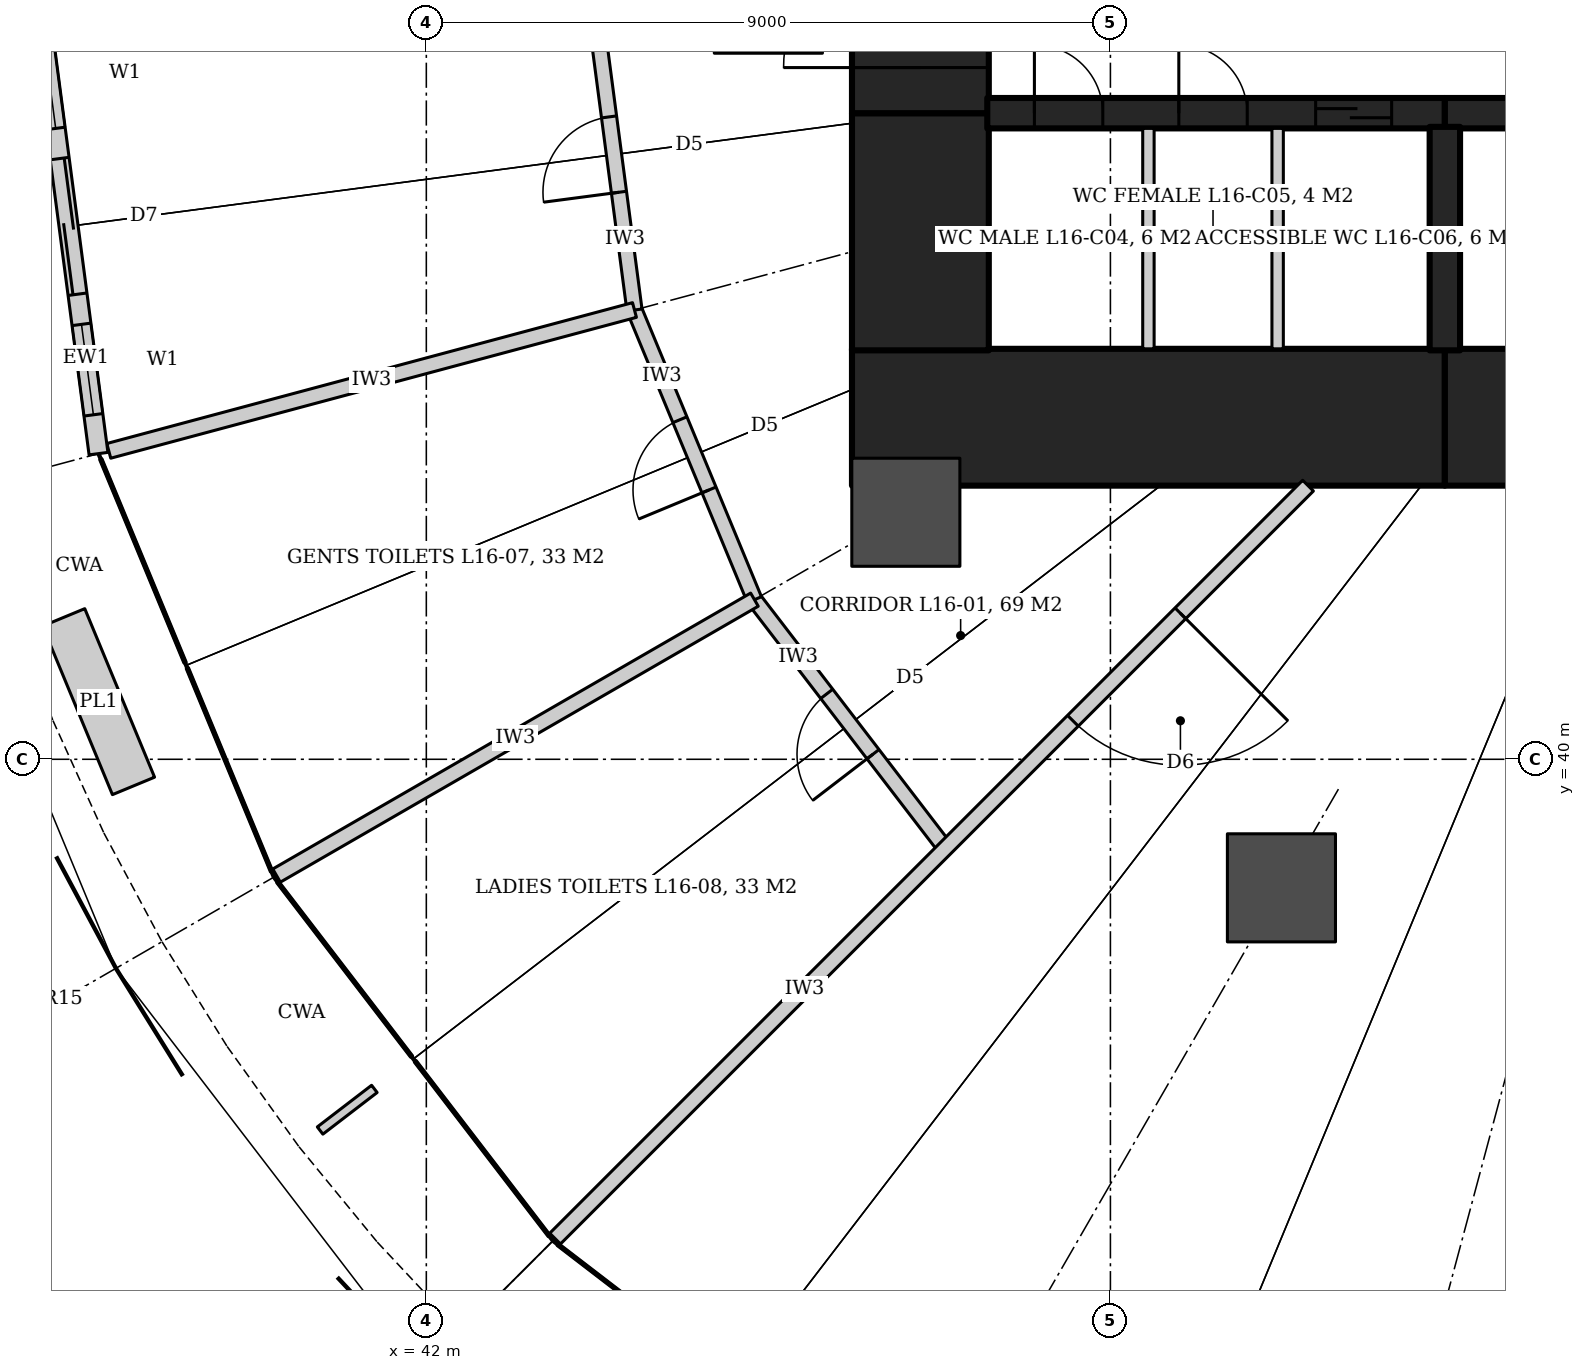
"""IFC4 building model, lengths in metres.
Left out: names, types, materials, properties, quantities, classifications, styles, units other than length and angle.
Written with IfcOpenShell. Run it as: python <this file> out.ifc"""

import sys

from ifc_helpers import new_model, si_unit, direction, frame, frame_2d, origin, origin_2d, place, context, subcontext, project, spatial, rectangle, hollow_circle, extrude, element, fill, save


model = new_model("IFC4")
c1 = context("Model", 3, precision=1e-05, world=origin(), true_north=direction((0.0, 1.0)))
c2 = subcontext(c1, "Body", "Model", "MODEL_VIEW")
j1 = project(units=[si_unit("LENGTHUNIT", "METRE"), si_unit("PLANEANGLEUNIT", "RADIAN")], contexts=[c1])
p1 = place(None, origin())
s1 = spatial("IfcSite", under=j1, at=p1, CompositionType="ELEMENT")
p2 = place(p1, origin())
s2 = spatial("IfcBuilding", under=s1, at=p2, CompositionType="ELEMENT")
p3 = place(p2, frame((0.0, 0.0, 68.0)))
s3 = spatial("IfcBuildingStorey", under=s2, at=p3, CompositionType="ELEMENT", Elevation=68.0)
p4 = place(p3, frame((47.6, 44.5, 0.0), z_axis=(0.0, 0.0, 1.0), x_axis=(1.0, 0.0, 0.0)))
e1 = element("IfcWall", 1, at=p4, inside=s3, PredefinedType="SHEAR", context=c2, shape_type="SweptSolid", body=[
    extrude(rectangle(XDim=7.8, YDim=1.8, at=frame_2d((3.9, 0.0))), origin(), (0.0, 0.0, 1.0), 4.2),
])
p5 = place(p3, frame((55.4, 44.5, 0.0), z_axis=(0.0, 0.0, 1.0), x_axis=(1.0, 0.0, 0.0)))
e2 = element("IfcWall", 2, at=p5, inside=s3, PredefinedType="SHEAR", context=c2, shape_type="SweptSolid", body=[
    extrude(rectangle(XDim=9.2, YDim=1.8, at=frame_2d((4.6, 0.0))), origin(), (0.0, 0.0, 1.0), 4.2),
])
p6 = place(p3, frame((48.5, 45.38, 0.0), z_axis=(0.0, 0.0, 1.0), x_axis=(0.0, 1.0, 0.0)))
e3 = element("IfcWall", 3, at=p6, inside=s3, PredefinedType="SHEAR", context=c2, shape_type="SweptSolid", body=[
    extrude(rectangle(XDim=3.12, YDim=1.8, at=frame_2d((1.56, 0.0))), origin(), (0.0, 0.0, 1.0), 4.2),
])
p7 = place(p3, frame((48.5, 48.5, 0.0), z_axis=(0.0, 0.0, 1.0), x_axis=(0.0, 1.0, 0.0)))
e4 = element("IfcWall", 4, at=p7, inside=s3, PredefinedType="SHEAR", context=c2, shape_type="SweptSolid", body=[
    extrude(rectangle(XDim=3.0, YDim=1.8, at=frame_2d((1.5, 0.0))), origin(), (0.0, 0.0, 1.0), 4.2),
])
p8 = place(p7, frame((0.6, 0.0, 0.0)))
e5 = element("IfcOpeningElement", 5, at=p8, cuts=e4, PredefinedType="OPENING", context=c2, shape_type="SweptSolid", body=[
    extrude(rectangle(XDim=1.8, YDim=2.1, at=frame_2d((0.9, 1.05))), frame((0.0, 0.91, 0.0), z_axis=(0.0, -1.0, 0.0), x_axis=(1.0, 0.0, 0.0)), (0.0, 0.0, 1.0), 1.82),
])
p9 = place(p3, frame((49.38, 48.5, 0.0), z_axis=(0.0, 0.0, 1.0), x_axis=(1.0, 0.0, 0.0)))
e6 = element("IfcWall", 6, at=p9, inside=s3, PredefinedType="SHEAR", context=c2, shape_type="SweptSolid", body=[
    extrude(rectangle(XDim=6.02, YDim=0.4, at=frame_2d((3.01, 0.0))), origin(), (0.0, 0.0, 1.0), 4.2),
])
p10 = place(p9, frame((0.62, 0.0, 0.0)))
e7 = element("IfcOpeningElement", 7, at=p10, cuts=e6, PredefinedType="OPENING", context=c2, shape_type="SweptSolid", body=[
    extrude(rectangle(XDim=0.9, YDim=2.1, at=frame_2d((0.45, 1.05))), frame((0.0, 0.21, 0.0), z_axis=(0.0, -1.0, 0.0), x_axis=(1.0, 0.0, 0.0)), (0.0, 0.0, 1.0), 0.42),
])
p11 = place(p9, frame((2.52, 0.0, 0.0)))
e8 = element("IfcOpeningElement", 8, at=p11, cuts=e6, PredefinedType="OPENING", context=c2, shape_type="SweptSolid", body=[
    extrude(rectangle(XDim=0.9, YDim=2.1, at=frame_2d((0.45, 1.05))), frame((0.0, 0.21, 0.0), z_axis=(0.0, -1.0, 0.0), x_axis=(1.0, 0.0, 0.0)), (0.0, 0.0, 1.0), 0.42),
])
p12 = place(p9, frame((4.32, 0.0, 0.0)))
e9 = element("IfcOpeningElement", 9, at=p12, cuts=e6, PredefinedType="OPENING", context=c2, shape_type="SweptSolid", body=[
    extrude(rectangle(XDim=1.0, YDim=2.1, at=frame_2d((0.5, 1.05))), frame((0.0, 0.21, 0.0), z_axis=(0.0, -1.0, 0.0), x_axis=(1.0, 0.0, 0.0)), (0.0, 0.0, 1.0), 0.42),
])
p13 = place(p3, frame((55.4, 48.5, 0.0), z_axis=(0.0, 0.0, 1.0), x_axis=(1.0, 0.0, 0.0)))
e10 = element("IfcWall", 10, at=p13, inside=s3, PredefinedType="SHEAR", context=c2, shape_type="SweptSolid", body=[
    extrude(rectangle(XDim=9.2, YDim=0.4, at=frame_2d((4.6, 0.0))), origin(), (0.0, 0.0, 1.0), 4.2),
])
p14 = place(p3, frame((55.4, 48.32, 0.0), z_axis=(0.0, 0.0, 1.0), x_axis=(0.0, -1.0, 0.0)))
e11 = element("IfcWall", 11, at=p14, inside=s3, PredefinedType="SHEAR", context=c2, shape_type="SweptSolid", body=[
    extrude(rectangle(XDim=2.94, YDim=0.4, at=frame_2d((1.47, 0.0))), origin(), (0.0, 0.0, 1.0), 4.2),
])
for number, where, z_axis, x_axis in (
    (12, (46.5, 50.0, 0.0), (0.0, 0.0, 1.0), (1.0, 0.0, 0.0)),
    (13, (48.309, 43.25, 0.0), (0.0, 0.0, 1.0), (1.0, 0.0, 0.0)),
    (14, (53.25, 38.309, 0.0), (0.0, 0.0, 1.0), (1.0, 0.0, 0.0)),
):
    element("IfcColumn", number, at=place(p3, frame(where, z_axis=z_axis, x_axis=x_axis)), inside=s3, PredefinedType="COLUMN", context=c2, shape_type="SweptSolid", body=[
        extrude(hollow_circle(Radius=0.711, WallThickness=0.07, at=origin_2d()), origin(), (0.0, 0.0, 1.0), 4.2),
    ])
p15 = place(p3, frame((48.828, 38.828, 0.0), z_axis=(0.0, 0.0, 1.0), x_axis=(-0.608714823874, 0.793389099494, 0.0)))
e15 = element("IfcWall", 15, at=p15, inside=s3, PredefinedType="PARTITIONING", context=c2, shape_type="SweptSolid", body=[
    extrude(rectangle(XDim=4.125, YDim=0.2, at=frame_2d((2.062, 0.0))), origin(), (0.0, 0.0, 1.0), 3.04),
])
p16 = place(p15, frame((1.562, 0.0, 0.0)))
e16 = element("IfcOpeningElement", 16, at=p16, cuts=e15, PredefinedType="OPENING", context=c2, shape_type="SweptSolid", body=[
    extrude(rectangle(XDim=1.0, YDim=2.1, at=frame_2d((0.5, 1.05))), frame((0.0, 0.11, 0.0), z_axis=(0.0, -1.0, 0.0), x_axis=(1.0, 0.0, 0.0)), (0.0, 0.0, 1.0), 0.22),
])
p17 = place(p3, frame((46.317, 42.1, 0.0), z_axis=(0.0, 0.0, 1.0), x_axis=(-0.382731667114, 0.923859551549, 0.0)))
e17 = element("IfcWall", 17, at=p17, inside=s3, PredefinedType="PARTITIONING", context=c2, shape_type="SweptSolid", body=[
    extrude(rectangle(XDim=4.125, YDim=0.2, at=frame_2d((2.062, 0.0))), origin(), (0.0, 0.0, 1.0), 3.04),
])
p18 = place(p17, frame((1.562, 0.0, 0.0)))
e18 = element("IfcOpeningElement", 18, at=p18, cuts=e17, PredefinedType="OPENING", context=c2, shape_type="SweptSolid", body=[
    extrude(rectangle(XDim=1.0, YDim=2.1, at=frame_2d((0.5, 1.05))), frame((0.0, 0.11, 0.0), z_axis=(0.0, -1.0, 0.0), x_axis=(1.0, 0.0, 0.0)), (0.0, 0.0, 1.0), 0.22),
])
p19 = place(p3, frame((44.738, 45.911, 0.0), z_axis=(0.0, 0.0, 1.0), x_axis=(-0.130515758099, 0.991446234996, 0.0)))
e19 = element("IfcWall", 19, at=p19, inside=s3, PredefinedType="PARTITIONING", context=c2, shape_type="SweptSolid", body=[
    extrude(rectangle(XDim=4.125, YDim=0.2, at=frame_2d((2.062, 0.0))), origin(), (0.0, 0.0, 1.0), 3.04),
])
p20 = place(p19, frame((1.562, 0.0, 0.0)))
e20 = element("IfcOpeningElement", 20, at=p20, cuts=e19, PredefinedType="OPENING", context=c2, shape_type="SweptSolid", body=[
    extrude(rectangle(XDim=1.0, YDim=2.1, at=frame_2d((0.5, 1.05))), frame((0.0, 0.11, 0.0), z_axis=(0.0, -1.0, 0.0), x_axis=(1.0, 0.0, 0.0)), (0.0, 0.0, 1.0), 0.22),
])
p21 = place(p3, frame((44.738, 45.911, 0.0), z_axis=(0.0, 0.0, 1.0), x_axis=(-0.965928911257, -0.258807531571, 0.0)))
e21 = element("IfcWall", 21, at=p21, inside=s3, PredefinedType="PARTITIONING", context=c2, shape_type="SweptSolid", body=[
    extrude(rectangle(XDim=7.06, YDim=0.2, at=frame_2d((3.53, 0.0))), origin(), (0.0, 0.0, 1.0), 3.04),
])
p22 = place(p3, frame((46.317, 42.1, 0.0), z_axis=(0.0, 0.0, 1.0), x_axis=(-0.866018643436, -0.500011709085, 0.0)))
e22 = element("IfcWall", 22, at=p22, inside=s3, PredefinedType="PARTITIONING", context=c2, shape_type="SweptSolid", body=[
    extrude(rectangle(XDim=7.16, YDim=0.2, at=frame_2d((3.58, 0.0))), origin(), (0.0, 0.0, 1.0), 3.04),
])
p23 = place(p3, frame((53.6, 43.6, 0.0), z_axis=(0.0, 0.0, 1.0), x_axis=(-0.707106781187, -0.707106781187, 0.0)))
e23 = element("IfcWall", 23, at=p23, inside=s3, PredefinedType="PARTITIONING", context=c2, shape_type="SweptSolid", body=[
    extrude(rectangle(XDim=13.909, YDim=0.2, at=frame_2d((6.955, 0.0))), origin(), (0.0, 0.0, 1.0), 3.02),
])
p24 = place(p23, frame((2.375, 0.0, 0.0)))
e24 = element("IfcOpeningElement", 24, at=p24, cuts=e23, PredefinedType="OPENING", context=c2, shape_type="SweptSolid", body=[
    extrude(rectangle(XDim=2.0, YDim=2.1, at=frame_2d((1.0, 1.05))), frame((0.0, 0.11, 0.0), z_axis=(0.0, -1.0, 0.0), x_axis=(1.0, 0.0, 0.0)), (0.0, 0.0, 1.0), 0.22),
])
p25 = place(p3, frame((37.0, 50.0, 0.0), z_axis=(0.0, 0.0, 1.0), x_axis=(0.130522880875, -0.991445297315, 0.0)))
e25 = element("IfcWall", 25, at=p25, inside=s3, PredefinedType="SOLIDWALL", context=c2, shape_type="SweptSolid", body=[
    extrude(rectangle(XDim=6.004, YDim=0.25, at=frame_2d((3.002, 0.0))), origin(), (0.0, 0.0, 1.0), 4.04),
])
p26 = place(p25, frame((2.102, 0.0, 0.0)))
e26 = element("IfcOpeningElement", 26, at=p26, cuts=e25, PredefinedType="OPENING", context=c2, shape_type="SweptSolid", body=[
    extrude(rectangle(XDim=1.8, YDim=2.4, at=frame_2d((0.9, 1.2))), frame((0.0, 0.135, 0.0), z_axis=(0.0, -1.0, 0.0), x_axis=(1.0, 0.0, 0.0)), (0.0, 0.0, 1.0), 0.27),
])
p27 = place(p25, frame((0.502, 0.0, 0.0)))
e27 = element("IfcOpeningElement", 27, at=p27, cuts=e25, PredefinedType="OPENING", context=c2, shape_type="SweptSolid", body=[
    extrude(rectangle(XDim=1.2, YDim=2.4, at=frame_2d((0.6, 1.2))), frame((0.0, 0.135, 0.0), z_axis=(0.0, -1.0, 0.0), x_axis=(1.0, 0.0, 0.0)), (0.0, 0.0, 1.0), 0.27),
])
p28 = place(p25, frame((4.302, 0.0, 0.0)))
e28 = element("IfcOpeningElement", 28, at=p28, cuts=e25, PredefinedType="OPENING", context=c2, shape_type="SweptSolid", body=[
    extrude(rectangle(XDim=1.2, YDim=2.4, at=frame_2d((0.6, 1.2))), frame((0.0, 0.135, 0.0), z_axis=(0.0, -1.0, 0.0), x_axis=(1.0, 0.0, 0.0)), (0.0, 0.0, 1.0), 0.27),
])
for number, where, z_axis, x_axis in (
    (29, (51.5, 45.4, 0.0), (0.0, 0.0, 1.0), (0.0, 1.0, 0.0)),
    (30, (53.2, 45.4, 0.0), (0.0, 0.0, 1.0), (0.0, 1.0, 0.0)),
):
    element("IfcWall", number, at=place(p3, frame(where, z_axis=z_axis, x_axis=x_axis)), inside=s3, PredefinedType="PARTITIONING", context=c2, shape_type="SweptSolid", body=[
        extrude(rectangle(XDim=2.9, YDim=0.15, at=frame_2d((1.45, 0.0))), origin(), (0.0, 0.0, 1.0), 4.04),
    ])
p29 = place(p20, origin())
e31 = element("IfcDoor", 31, at=p29, inside=s3, OperationType="SINGLE_SWING_LEFT", PredefinedType="DOOR", context=c2, shape_type="SweptSolid", body=[
    extrude(rectangle(XDim=1.0, YDim=2.1, at=frame_2d((0.5, 1.05))), frame((0.0, 0.025, 0.0), z_axis=(0.0, -1.0, 0.0), x_axis=(1.0, 0.0, 0.0)), (0.0, 0.0, 1.0), 0.05),
])
fill(e20, e31)
p30 = place(p18, origin())
e32 = element("IfcDoor", 32, at=p30, inside=s3, OperationType="SINGLE_SWING_LEFT", PredefinedType="DOOR", context=c2, shape_type="SweptSolid", body=[
    extrude(rectangle(XDim=1.0, YDim=2.1, at=frame_2d((0.5, 1.05))), frame((0.0, 0.025, 0.0), z_axis=(0.0, -1.0, 0.0), x_axis=(1.0, 0.0, 0.0)), (0.0, 0.0, 1.0), 0.05),
])
fill(e18, e32)
p31 = place(p16, origin())
e33 = element("IfcDoor", 33, at=p31, inside=s3, OperationType="SINGLE_SWING_LEFT", PredefinedType="DOOR", context=c2, shape_type="SweptSolid", body=[
    extrude(rectangle(XDim=1.0, YDim=2.1, at=frame_2d((0.5, 1.05))), frame((0.0, 0.025, 0.0), z_axis=(0.0, -1.0, 0.0), x_axis=(1.0, 0.0, 0.0)), (0.0, 0.0, 1.0), 0.05),
])
fill(e16, e33)
p32 = place(p24, origin())
e34 = element("IfcDoor", 34, at=p32, inside=s3, OperationType="DOUBLE_DOOR_DOUBLE_SWING", PredefinedType="DOOR", context=c2, shape_type="SweptSolid", body=[
    extrude(rectangle(XDim=2.0, YDim=2.1, at=frame_2d((1.0, 1.05))), frame((0.0, 0.025, 0.0), z_axis=(0.0, -1.0, 0.0), x_axis=(1.0, 0.0, 0.0)), (0.0, 0.0, 1.0), 0.05),
])
fill(e24, e34)
p33 = place(p26, origin())
e35 = element("IfcDoor", 35, at=p33, inside=s3, OperationType="DOUBLE_DOOR_SLIDING", PredefinedType="DOOR", context=c2, shape_type="SweptSolid", body=[
    extrude(rectangle(XDim=1.8, YDim=2.4, at=frame_2d((0.9, 1.2))), frame((0.0, 0.025, 0.0), z_axis=(0.0, -1.0, 0.0), x_axis=(1.0, 0.0, 0.0)), (0.0, 0.0, 1.0), 0.05),
])
fill(e26, e35)
p34 = place(p27, origin())
e36 = element("IfcWindow", 36, at=p34, inside=s3, PartitioningType="SINGLE_PANEL", PredefinedType="WINDOW", context=c2, shape_type="SweptSolid", body=[
    extrude(rectangle(XDim=1.2, YDim=2.4, at=frame_2d((0.6, 1.2))), frame((0.0, 0.03, 0.0), z_axis=(0.0, -1.0, 0.0), x_axis=(1.0, 0.0, 0.0)), (0.0, 0.0, 1.0), 0.06),
])
fill(e27, e36)
p35 = place(p28, origin())
e37 = element("IfcWindow", 37, at=p35, inside=s3, PartitioningType="SINGLE_PANEL", PredefinedType="WINDOW", context=c2, shape_type="SweptSolid", body=[
    extrude(rectangle(XDim=1.2, YDim=2.4, at=frame_2d((0.6, 1.2))), frame((0.0, 0.03, 0.0), z_axis=(0.0, -1.0, 0.0), x_axis=(1.0, 0.0, 0.0)), (0.0, 0.0, 1.0), 0.06),
])
fill(e28, e37)
p36 = place(p10, origin())
e38 = element("IfcDoor", 38, at=p36, inside=s3, OperationType="SINGLE_SWING_RIGHT", PredefinedType="DOOR", context=c2, shape_type="SweptSolid", body=[
    extrude(rectangle(XDim=0.9, YDim=2.1, at=frame_2d((0.45, 1.05))), frame((0.0, 0.025, 0.0), z_axis=(0.0, -1.0, 0.0), x_axis=(1.0, 0.0, 0.0)), (0.0, 0.0, 1.0), 0.05),
])
fill(e7, e38)
p37 = place(p11, origin())
e39 = element("IfcDoor", 39, at=p37, inside=s3, OperationType="SINGLE_SWING_RIGHT", PredefinedType="DOOR", context=c2, shape_type="SweptSolid", body=[
    extrude(rectangle(XDim=0.9, YDim=2.1, at=frame_2d((0.45, 1.05))), frame((0.0, 0.025, 0.0), z_axis=(0.0, -1.0, 0.0), x_axis=(1.0, 0.0, 0.0)), (0.0, 0.0, 1.0), 0.05),
])
fill(e8, e39)
p38 = place(p12, origin())
e40 = element("IfcDoor", 40, at=p38, inside=s3, OperationType="SLIDING_TO_LEFT", PredefinedType="DOOR", context=c2, shape_type="SweptSolid", body=[
    extrude(rectangle(XDim=1.0, YDim=2.1, at=frame_2d((0.5, 1.05))), frame((0.0, 0.025, 0.0), z_axis=(0.0, -1.0, 0.0), x_axis=(1.0, 0.0, 0.0)), (0.0, 0.0, 1.0), 0.05),
])
fill(e9, e40)
p39 = place(p8, origin())
e41 = element("IfcDoor", 41, at=p39, inside=s3, OperationType="DOUBLE_DOOR_DOUBLE_SWING", PredefinedType="DOOR", context=c2, shape_type="SweptSolid", body=[
    extrude(rectangle(XDim=1.8, YDim=2.1, at=frame_2d((0.9, 1.05))), frame((0.0, 0.025, 0.0), z_axis=(0.0, -1.0, 0.0), x_axis=(1.0, 0.0, 0.0)), (0.0, 0.0, 1.0), 0.05),
])
fill(e5, e41)
save(model, sys.argv[1])
